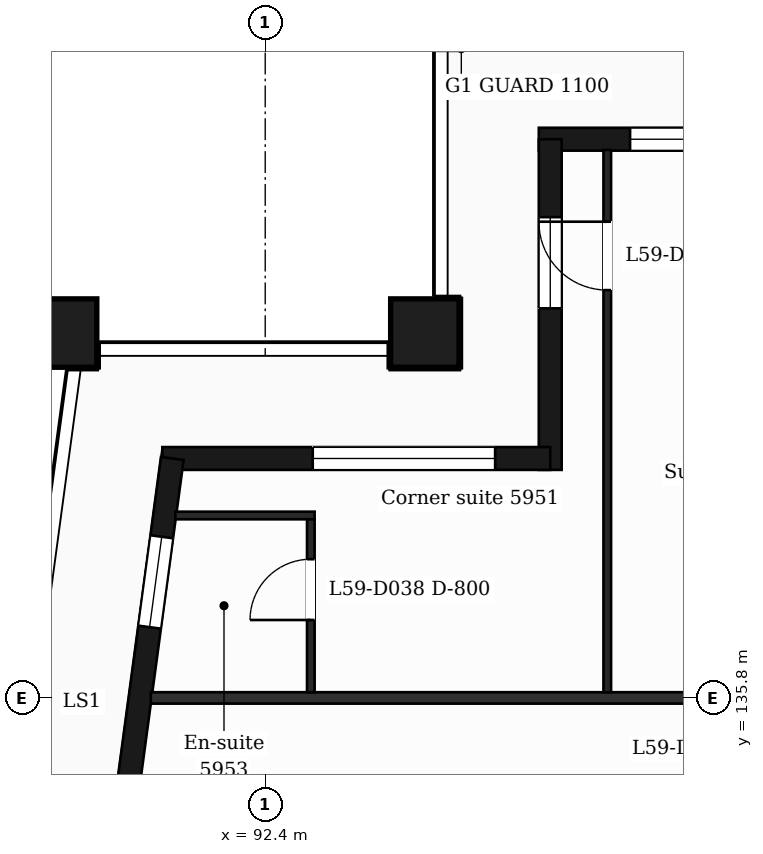
"""IFC4 building model, lengths in metres.
Left out: names, types, materials, properties, quantities, classifications, styles, units other than length and angle.
Written with IfcOpenShell. Run it as: python <this file> out.ifc"""

import sys

from ifc_helpers import new_model, si_unit, direction, frame, frame_2d, origin, origin_2d, place, context, subcontext, project, spatial, rectangle, extrude, element, fill, save


model = new_model("IFC4")
c1 = context("Model", 3, precision=1e-05, world=origin(), true_north=direction((0.0, 1.0)))
c2 = subcontext(c1, "Body", "Model", "MODEL_VIEW")
j1 = project(units=[si_unit("LENGTHUNIT", "METRE"), si_unit("PLANEANGLEUNIT", "RADIAN")], contexts=[c1])
p1 = place(None, origin())
s1 = spatial("IfcSite", under=j1, at=p1, CompositionType="ELEMENT")
p2 = place(p1, origin())
s2 = spatial("IfcBuilding", under=s1, at=p2, CompositionType="ELEMENT")
p3 = place(p2, frame((0.0, 0.0, 242.9)))
s3 = spatial("IfcBuildingStorey", under=s2, at=p3, CompositionType="ELEMENT", Elevation=242.9)
for number, where, z_axis, x_axis in (
    (1, (94.5, 140.6, 0.0), (0.0, 0.0, 1.0), (1.0, 0.0, 0.0)),
    (2, (89.735, 140.6, 0.0), (0.0, 0.0, 1.0), (1.0, 0.0, 0.0)),
):
    element("IfcColumn", number, at=place(p3, frame(where, z_axis=z_axis, x_axis=x_axis)), inside=s3, PredefinedType="COLUMN", context=c2, shape_type="SweptSolid", body=[
        extrude(rectangle(XDim=0.9, YDim=0.9, at=origin_2d()), origin(), (0.0, 0.0, 1.0), 3.7),
    ])
p4 = place(p3, frame((112.5, 143.15, 0.0), z_axis=(0.0, 0.0, 1.0), x_axis=(-1.0, 0.0, 0.0)))
e3 = element("IfcWall", 3, at=p4, inside=s3, PredefinedType="SOLIDWALL", context=c2, shape_type="SweptSolid", body=[
    extrude(rectangle(XDim=16.5, YDim=0.3, at=frame_2d((8.25, 0.0))), origin(), (0.0, 0.0, 1.0), 3.2),
])
p5 = place(p4, frame((1.1, 0.0, 0.9)))
e4 = element("IfcOpeningElement", 4, at=p5, cuts=e3, PredefinedType="OPENING", context=c2, shape_type="SweptSolid", body=[
    extrude(rectangle(XDim=1.2, YDim=2.1, at=frame_2d((0.6, 1.05))), frame((0.0, 0.16, 0.0), z_axis=(0.0, -1.0, 0.0), x_axis=(1.0, 0.0, 0.0)), (0.0, 0.0, 1.0), 0.32),
])
p6 = place(p4, frame((4.2, 0.0, 0.9)))
e5 = element("IfcOpeningElement", 5, at=p6, cuts=e3, PredefinedType="OPENING", context=c2, shape_type="SweptSolid", body=[
    extrude(rectangle(XDim=2.4, YDim=2.1, at=frame_2d((1.2, 1.05))), frame((0.0, 0.16, 0.0), z_axis=(0.0, -1.0, 0.0), x_axis=(1.0, 0.0, 0.0)), (0.0, 0.0, 1.0), 0.32),
])
p7 = place(p4, frame((8.4, 0.0, 0.9)))
e6 = element("IfcOpeningElement", 6, at=p7, cuts=e3, PredefinedType="OPENING", context=c2, shape_type="SweptSolid", body=[
    extrude(rectangle(XDim=2.4, YDim=2.1, at=frame_2d((1.2, 1.05))), frame((0.0, 0.16, 0.0), z_axis=(0.0, -1.0, 0.0), x_axis=(1.0, 0.0, 0.0)), (0.0, 0.0, 1.0), 0.32),
])
p8 = place(p4, frame((12.3, 0.0, 0.0)))
e7 = element("IfcOpeningElement", 7, at=p8, cuts=e3, PredefinedType="OPENING", context=c2, shape_type="SweptSolid", body=[
    extrude(rectangle(XDim=1.2, YDim=2.4, at=frame_2d((0.6, 1.2))), frame((0.0, 0.16, 0.0), z_axis=(0.0, -1.0, 0.0), x_axis=(1.0, 0.0, 0.0)), (0.0, 0.0, 1.0), 0.32),
])
p9 = place(p4, frame((14.1, 0.0, 0.9)))
e8 = element("IfcOpeningElement", 8, at=p9, cuts=e3, PredefinedType="OPENING", context=c2, shape_type="SweptSolid", body=[
    extrude(rectangle(XDim=1.2, YDim=2.1, at=frame_2d((0.6, 1.05))), frame((0.0, 0.16, 0.0), z_axis=(0.0, -1.0, 0.0), x_axis=(1.0, 0.0, 0.0)), (0.0, 0.0, 1.0), 0.32),
])
p10 = place(p3, frame((96.15, 143.15, 0.0), z_axis=(0.0, 0.0, 1.0), x_axis=(0.0, -1.0, 0.0)))
e9 = element("IfcWall", 9, at=p10, inside=s3, PredefinedType="SOLIDWALL", context=c2, shape_type="SweptSolid", body=[
    extrude(rectangle(XDim=4.35, YDim=0.3, at=frame_2d((2.175, 0.0))), origin(), (0.0, 0.0, 1.0), 3.2),
])
p11 = place(p10, frame((1.025, 0.0, 0.9)))
e10 = element("IfcOpeningElement", 10, at=p11, cuts=e9, PredefinedType="OPENING", context=c2, shape_type="SweptSolid", body=[
    extrude(rectangle(XDim=1.2, YDim=2.1, at=frame_2d((0.6, 1.05))), frame((0.0, 0.16, 0.0), z_axis=(0.0, -1.0, 0.0), x_axis=(1.0, 0.0, 0.0)), (0.0, 0.0, 1.0), 0.32),
])
p12 = place(p3, frame((96.15, 138.95, 0.0), z_axis=(0.0, 0.0, 1.0), x_axis=(-1.0, 0.0, 0.0)))
e11 = element("IfcWall", 11, at=p12, inside=s3, PredefinedType="SOLIDWALL", context=c2, shape_type="SweptSolid", body=[
    extrude(rectangle(XDim=5.104, YDim=0.3, at=frame_2d((2.552, 0.0))), origin(), (0.0, 0.0, 1.0), 3.2),
])
p13 = place(p12, frame((0.725, 0.0, 0.9)))
e12 = element("IfcOpeningElement", 12, at=p13, cuts=e11, PredefinedType="OPENING", context=c2, shape_type="SweptSolid", body=[
    extrude(rectangle(XDim=2.4, YDim=2.1, at=frame_2d((1.2, 1.05))), frame((0.0, 0.16, 0.0), z_axis=(0.0, -1.0, 0.0), x_axis=(1.0, 0.0, 0.0)), (0.0, 0.0, 1.0), 0.32),
])
p14 = place(p3, frame((91.177, 138.95, 0.0), z_axis=(0.0, 0.0, 1.0), x_axis=(-0.133426664613, -0.991058689065, 0.0)))
e13 = element("IfcWall", 13, at=p14, inside=s3, PredefinedType="SOLIDWALL", context=c2, shape_type="SweptSolid", body=[
    extrude(rectangle(XDim=6.609, YDim=0.3, at=frame_2d((3.305, 0.0))), origin(), (0.0, 0.0, 1.0), 3.2),
])
p15 = place(p14, frame((1.039, 0.0, 0.9)))
e14 = element("IfcOpeningElement", 14, at=p15, cuts=e13, PredefinedType="OPENING", context=c2, shape_type="SweptSolid", body=[
    extrude(rectangle(XDim=1.2, YDim=2.1, at=frame_2d((0.6, 1.05))), frame((0.0, 0.16, 0.0), z_axis=(0.0, -1.0, 0.0), x_axis=(1.0, 0.0, 0.0)), (0.0, 0.0, 1.0), 0.32),
])
p16 = place(p14, frame((4.294, 0.0, 0.0)))
e15 = element("IfcOpeningElement", 15, at=p16, cuts=e13, PredefinedType="OPENING", context=c2, shape_type="SweptSolid", body=[
    extrude(rectangle(XDim=1.2, YDim=2.4, at=frame_2d((0.6, 1.2))), frame((0.0, 0.16, 0.0), z_axis=(0.0, -1.0, 0.0), x_axis=(1.0, 0.0, 0.0)), (0.0, 0.0, 1.0), 0.32),
])
p17 = place(p3, frame((90.895, 135.8, 0.0), z_axis=(0.0, 0.0, 1.0), x_axis=(1.0, 0.0, 0.0)))
e16 = element("IfcWall", 16, at=p17, inside=s3, PredefinedType="PARTITIONING", context=c2, shape_type="SweptSolid", body=[
    extrude(rectangle(XDim=45.011, YDim=0.15, at=frame_2d((22.505, 0.0))), origin(), (0.0, 0.0, 1.0), 3.2),
])
p18 = place(p17, frame((7.455, 0.0, 0.0)))
e17 = element("IfcOpeningElement", 17, at=p18, cuts=e16, PredefinedType="OPENING", context=c2, shape_type="SweptSolid", body=[
    extrude(rectangle(XDim=1.0, YDim=2.1, at=frame_2d((0.5, 1.05))), frame((0.0, 0.085, 0.0), z_axis=(0.0, -1.0, 0.0), x_axis=(1.0, 0.0, 0.0)), (0.0, 0.0, 1.0), 0.17),
])
p19 = place(p17, frame((10.88, 0.0, 0.0)))
e18 = element("IfcOpeningElement", 18, at=p19, cuts=e16, PredefinedType="OPENING", context=c2, shape_type="SweptSolid", body=[
    extrude(rectangle(XDim=1.0, YDim=2.1, at=frame_2d((0.5, 1.05))), frame((0.0, 0.085, 0.0), z_axis=(0.0, -1.0, 0.0), x_axis=(1.0, 0.0, 0.0)), (0.0, 0.0, 1.0), 0.17),
])
p20 = place(p17, frame((27.88, 0.0, 0.0)))
e19 = element("IfcOpeningElement", 19, at=p20, cuts=e16, PredefinedType="OPENING", context=c2, shape_type="SweptSolid", body=[
    extrude(rectangle(XDim=1.0, YDim=2.1, at=frame_2d((0.5, 1.05))), frame((0.0, 0.085, 0.0), z_axis=(0.0, -1.0, 0.0), x_axis=(1.0, 0.0, 0.0)), (0.0, 0.0, 1.0), 0.17),
])
p21 = place(p17, frame((33.168, 0.0, 0.0)))
e20 = element("IfcOpeningElement", 20, at=p21, cuts=e16, PredefinedType="OPENING", context=c2, shape_type="SweptSolid", body=[
    extrude(rectangle(XDim=0.95, YDim=2.1, at=frame_2d((0.475, 1.05))), frame((0.0, 0.085, 0.0), z_axis=(0.0, -1.0, 0.0), x_axis=(1.0, 0.0, 0.0)), (0.0, 0.0, 1.0), 0.17),
])
p22 = place(p17, frame((36.906, 0.0, 0.0)))
e21 = element("IfcOpeningElement", 21, at=p22, cuts=e16, PredefinedType="OPENING", context=c2, shape_type="SweptSolid", body=[
    extrude(rectangle(XDim=1.0, YDim=2.1, at=frame_2d((0.5, 1.05))), frame((0.0, 0.085, 0.0), z_axis=(0.0, -1.0, 0.0), x_axis=(1.0, 0.0, 0.0)), (0.0, 0.0, 1.0), 0.17),
])
p23 = place(p3, frame((91.218, 138.2, 0.0), z_axis=(0.0, 0.0, 1.0), x_axis=(1.0, 0.0, 0.0)))
e22 = element("IfcWall", 22, at=p23, inside=s3, PredefinedType="PARTITIONING", context=c2, shape_type="SweptSolid", body=[
    extrude(rectangle(XDim=1.832, YDim=0.1, at=frame_2d((0.916, 0.0))), origin(), (0.0, 0.0, 1.0), 3.2),
])
p24 = place(p3, frame((93.0, 135.875, 0.0), z_axis=(0.0, 0.0, 1.0), x_axis=(0.0, 1.0, 0.0)))
e23 = element("IfcWall", 23, at=p24, inside=s3, PredefinedType="PARTITIONING", context=c2, shape_type="SweptSolid", body=[
    extrude(rectangle(XDim=2.275, YDim=0.1, at=frame_2d((1.137, 0.0))), origin(), (0.0, 0.0, 1.0), 3.2),
])
p25 = place(p24, frame((0.95, 0.0, 0.0)))
e24 = element("IfcOpeningElement", 24, at=p25, cuts=e23, PredefinedType="OPENING", context=c2, shape_type="SweptSolid", body=[
    extrude(rectangle(XDim=0.8, YDim=2.1, at=frame_2d((0.4, 1.05))), frame((0.0, 0.06, 0.0), z_axis=(0.0, -1.0, 0.0), x_axis=(1.0, 0.0, 0.0)), (0.0, 0.0, 1.0), 0.12),
])
p26 = place(p3, frame((96.9, 135.875, 0.0), z_axis=(0.0, 0.0, 1.0), x_axis=(0.0, 1.0, 0.0)))
e25 = element("IfcWall", 25, at=p26, inside=s3, PredefinedType="PARTITIONING", context=c2, shape_type="SweptSolid", body=[
    extrude(rectangle(XDim=7.135, YDim=0.1, at=frame_2d((3.567, 0.0))), origin(), (0.0, 0.0, 1.0), 3.2),
])
p27 = place(p26, frame((5.29, 0.0, 0.0)))
e26 = element("IfcOpeningElement", 26, at=p27, cuts=e25, PredefinedType="OPENING", context=c2, shape_type="SweptSolid", body=[
    extrude(rectangle(XDim=0.9, YDim=2.1, at=frame_2d((0.45, 1.05))), frame((0.0, 0.06, 0.0), z_axis=(0.0, -1.0, 0.0), x_axis=(1.0, 0.0, 0.0)), (0.0, 0.0, 1.0), 0.12),
])
p28 = place(p9, origin())
e27 = element("IfcWindow", 27, at=p28, inside=s3, PartitioningType="SINGLE_PANEL", PredefinedType="WINDOW", context=c2, shape_type="SweptSolid", body=[
    extrude(rectangle(XDim=1.2, YDim=2.1, at=frame_2d((0.6, 1.05))), frame((0.0, 0.03, 0.0), z_axis=(0.0, -1.0, 0.0), x_axis=(1.0, 0.0, 0.0)), (0.0, 0.0, 1.0), 0.06),
])
fill(e8, e27)
p29 = place(p11, origin())
e28 = element("IfcWindow", 28, at=p29, inside=s3, PartitioningType="SINGLE_PANEL", PredefinedType="WINDOW", context=c2, shape_type="SweptSolid", body=[
    extrude(rectangle(XDim=1.2, YDim=2.1, at=frame_2d((0.6, 1.05))), frame((0.0, 0.03, 0.0), z_axis=(0.0, -1.0, 0.0), x_axis=(1.0, 0.0, 0.0)), (0.0, 0.0, 1.0), 0.06),
])
fill(e10, e28)
p30 = place(p13, origin())
e29 = element("IfcWindow", 29, at=p30, inside=s3, PartitioningType="SINGLE_PANEL", PredefinedType="WINDOW", context=c2, shape_type="SweptSolid", body=[
    extrude(rectangle(XDim=2.4, YDim=2.1, at=frame_2d((1.2, 1.05))), frame((0.0, 0.03, 0.0), z_axis=(0.0, -1.0, 0.0), x_axis=(1.0, 0.0, 0.0)), (0.0, 0.0, 1.0), 0.06),
])
fill(e12, e29)
p31 = place(p15, origin())
e30 = element("IfcWindow", 30, at=p31, inside=s3, PartitioningType="SINGLE_PANEL", PredefinedType="WINDOW", context=c2, shape_type="SweptSolid", body=[
    extrude(rectangle(XDim=1.2, YDim=2.1, at=frame_2d((0.6, 1.05))), frame((0.0, 0.03, 0.0), z_axis=(0.0, -1.0, 0.0), x_axis=(1.0, 0.0, 0.0)), (0.0, 0.0, 1.0), 0.06),
])
fill(e14, e30)
p32 = place(p27, origin())
e31 = element("IfcDoor", 31, at=p32, inside=s3, OperationType="SINGLE_SWING_RIGHT", PredefinedType="DOOR", context=c2, shape_type="SweptSolid", body=[
    extrude(rectangle(XDim=0.9, YDim=2.1, at=frame_2d((0.45, 1.05))), frame((0.0, 0.025, 0.0), z_axis=(0.0, -1.0, 0.0), x_axis=(1.0, 0.0, 0.0)), (0.0, 0.0, 1.0), 0.05),
])
fill(e26, e31)
p33 = place(p25, origin())
e32 = element("IfcDoor", 32, at=p33, inside=s3, OperationType="SINGLE_SWING_LEFT", PredefinedType="DOOR", context=c2, shape_type="SweptSolid", body=[
    extrude(rectangle(XDim=0.8, YDim=2.1, at=frame_2d((0.4, 1.05))), frame((0.0, 0.025, 0.0), z_axis=(0.0, -1.0, 0.0), x_axis=(1.0, 0.0, 0.0)), (0.0, 0.0, 1.0), 0.05),
])
fill(e24, e32)
save(model, sys.argv[1])
